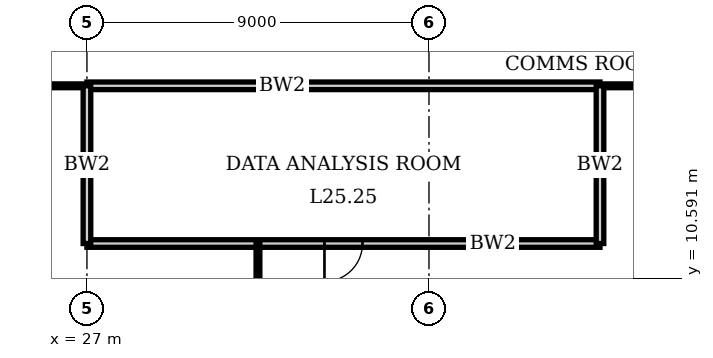
"""IFC4 building model, lengths in metres.
Left out: names, types, materials, properties, quantities, classifications, styles, units other than length and angle.
Written with IfcOpenShell. Run it as: python <this file> out.ifc"""

import sys

from ifc_helpers import new_model, si_unit, direction, frame, frame_2d, origin, place, context, subcontext, project, spatial, rectangle, extrude, element, fill, save


model = new_model("IFC4")
c1 = context("Model", 3, precision=1e-05, world=origin(), true_north=direction((0.0, 1.0)))
c2 = subcontext(c1, "Body", "Model", "MODEL_VIEW")
j1 = project(units=[si_unit("LENGTHUNIT", "METRE"), si_unit("PLANEANGLEUNIT", "RADIAN")], contexts=[c1])
p1 = place(None, origin())
s1 = spatial("IfcSite", under=j1, at=p1, CompositionType="ELEMENT")
p2 = place(p1, origin())
s2 = spatial("IfcBuilding", under=s1, at=p2, CompositionType="ELEMENT")
p3 = place(p2, frame((0.0, 0.0, 105.0)))
s3 = spatial("IfcBuildingStorey", under=s2, at=p3, CompositionType="ELEMENT", Elevation=105.0)
p4 = place(p3, frame((27.0, 11.5, 0.0), z_axis=(0.0, 0.0, 1.0), x_axis=(1.0, 0.0, 0.0)))
e1 = element("IfcWall", 1, at=p4, inside=s3, PredefinedType="SOLIDWALL", context=c2, shape_type="SweptSolid", body=[
    extrude(rectangle(XDim=13.5, YDim=0.2, at=frame_2d((6.75, 0.0))), origin(), (0.0, 0.0, 1.0), 3.75),
])
p5 = place(p4, frame((6.25, 0.0, 0.0)))
e2 = element("IfcOpeningElement", 2, at=p5, cuts=e1, PredefinedType="OPENING", context=c2, shape_type="SweptSolid", body=[
    extrude(rectangle(XDim=1.0, YDim=2.4, at=frame_2d((0.5, 1.2))), frame((0.0, 0.11, 0.0), z_axis=(0.0, -1.0, 0.0), x_axis=(1.0, 0.0, 0.0)), (0.0, 0.0, 1.0), 0.22),
])
p6 = place(p3, frame((27.0, 15.65, 0.0), z_axis=(0.0, 0.0, 1.0), x_axis=(1.0, 0.0, 0.0)))
e3 = element("IfcWall", 3, at=p6, inside=s3, PredefinedType="SOLIDWALL", context=c2, shape_type="SweptSolid", body=[
    extrude(rectangle(XDim=13.5, YDim=0.2, at=frame_2d((6.75, 0.0))), origin(), (0.0, 0.0, 1.0), 3.75),
])
p7 = place(p3, frame((15.65, 15.65, 0.0), z_axis=(0.0, 0.0, 1.0), x_axis=(1.0, 0.0, 0.0)))
e4 = element("IfcWall", 4, at=p7, inside=s3, PredefinedType="PARTITIONING", context=c2, shape_type="SweptSolid", body=[
    extrude(rectangle(XDim=11.35, YDim=0.1, at=frame_2d((5.675, 0.0))), origin(), (0.0, 0.0, 1.0), 3.75),
])
p8 = place(p7, frame((5.175, 0.0, 0.0)))
e5 = element("IfcOpeningElement", 5, at=p8, cuts=e4, PredefinedType="OPENING", context=c2, shape_type="SweptSolid", body=[
    extrude(rectangle(XDim=1.0, YDim=2.4, at=frame_2d((0.5, 1.2))), frame((0.0, 0.06, 0.0), z_axis=(0.0, -1.0, 0.0), x_axis=(1.0, 0.0, 0.0)), (0.0, 0.0, 1.0), 0.12),
])
p9 = place(p3, frame((40.5, 15.65, 0.0), z_axis=(0.0, 0.0, 1.0), x_axis=(1.0, 0.0, 0.0)))
e6 = element("IfcWall", 6, at=p9, inside=s3, PredefinedType="PARTITIONING", context=c2, shape_type="SweptSolid", body=[
    extrude(rectangle(XDim=6.85, YDim=0.1, at=frame_2d((3.425, 0.0))), origin(), (0.0, 0.0, 1.0), 3.75),
])
p10 = place(p9, frame((2.925, 0.0, 0.0)))
e7 = element("IfcOpeningElement", 7, at=p10, cuts=e6, PredefinedType="OPENING", context=c2, shape_type="SweptSolid", body=[
    extrude(rectangle(XDim=1.0, YDim=2.4, at=frame_2d((0.5, 1.2))), frame((0.0, 0.06, 0.0), z_axis=(0.0, -1.0, 0.0), x_axis=(1.0, 0.0, 0.0)), (0.0, 0.0, 1.0), 0.12),
])
p11 = place(p3, frame((27.0, 11.5, 0.0), z_axis=(0.0, 0.0, 1.0), x_axis=(0.0, 1.0, 0.0)))
e8 = element("IfcWall", 8, at=p11, inside=s3, PredefinedType="SOLIDWALL", context=c2, shape_type="SweptSolid", body=[
    extrude(rectangle(XDim=4.15, YDim=0.2, at=frame_2d((2.075, 0.0))), origin(), (0.0, 0.0, 1.0), 3.05),
])
p12 = place(p3, frame((31.5, 0.31, 0.0), z_axis=(0.0, 0.0, 1.0), x_axis=(0.0, 1.0, 0.0)))
e9 = element("IfcWall", 9, at=p12, inside=s3, PredefinedType="PARTITIONING", context=c2, shape_type="SweptSolid", body=[
    extrude(rectangle(XDim=11.2, YDim=0.1, at=frame_2d((5.6, 0.0))), origin(), (0.0, 0.0, 1.0), 3.75),
])
p13 = place(p3, frame((40.5, 11.5, 0.0), z_axis=(0.0, 0.0, 1.0), x_axis=(0.0, 1.0, 0.0)))
e10 = element("IfcWall", 10, at=p13, inside=s3, PredefinedType="SOLIDWALL", context=c2, shape_type="SweptSolid", body=[
    extrude(rectangle(XDim=4.15, YDim=0.2, at=frame_2d((2.075, 0.0))), origin(), (0.0, 0.0, 1.0), 3.75),
])
p14 = place(p5, origin())
e11 = element("IfcDoor", 11, at=p14, inside=s3, OperationType="SINGLE_SWING_LEFT", PredefinedType="DOOR", context=c2, shape_type="SweptSolid", body=[
    extrude(rectangle(XDim=1.0, YDim=2.4, at=frame_2d((0.5, 1.2))), frame((0.0, 0.035, 0.0), z_axis=(0.0, -1.0, 0.0), x_axis=(1.0, 0.0, 0.0)), (0.0, 0.0, 1.0), 0.07),
])
fill(e2, e11)
save(model, sys.argv[1])
